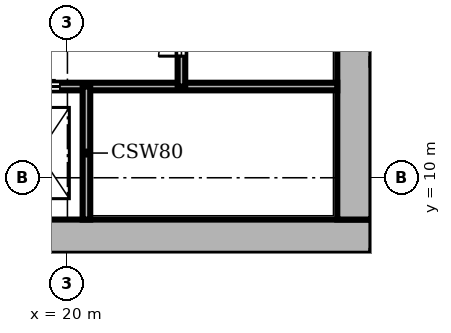
"""IFC4 building model, lengths in metres.
Left out: names, types, materials, properties, quantities, classifications, styles, units other than length and angle.
Written with IfcOpenShell. Run it as: python <this file> out.ifc"""

import sys

from ifc_helpers import new_model, si_unit, direction, frame, frame_2d, origin, place, context, subcontext, project, spatial, rectangle, extrude, element, fill, save


model = new_model("IFC4")
c1 = context("Model", 3, precision=1e-05, world=origin(), true_north=direction((0.0, 1.0)))
c2 = subcontext(c1, "Body", "Model", "MODEL_VIEW")
j1 = project(units=[si_unit("LENGTHUNIT", "METRE"), si_unit("PLANEANGLEUNIT", "RADIAN")], contexts=[c1])
p1 = place(None, origin())
s1 = spatial("IfcSite", under=j1, at=p1, CompositionType="ELEMENT")
p2 = place(p1, origin())
s2 = spatial("IfcBuilding", under=s1, at=p2, CompositionType="ELEMENT")
p3 = place(p2, frame((0.0, 0.0, 82.2)))
s3 = spatial("IfcBuildingStorey", under=s2, at=p3, CompositionType="ELEMENT", Elevation=82.2)
p4 = place(p3, frame((8.0, 8.45, 0.0), z_axis=(0.0, 0.0, 1.0), x_axis=(1.0, 0.0, 0.0)))
e1 = element("IfcWall", 1, at=p4, inside=s3, PredefinedType="SHEAR", context=c2, shape_type="SweptSolid", body=[
    extrude(rectangle(XDim=20.0, YDim=0.9, at=frame_2d((10.0, 0.0))), origin(), (0.0, 0.0, 1.0), 3.9),
])
p5 = place(p3, frame((27.55, 8.9, 0.0), z_axis=(0.0, 0.0, 1.0), x_axis=(0.0, 1.0, 0.0)))
e2 = element("IfcWall", 2, at=p5, inside=s3, PredefinedType="SHEAR", context=c2, shape_type="SweptSolid", body=[
    extrude(rectangle(XDim=18.2, YDim=0.9, at=frame_2d((9.1, 0.0))), origin(), (0.0, 0.0, 1.0), 3.9),
])
p6 = place(p5, frame((4.55, 0.0, 0.0)))
e3 = element("IfcOpeningElement", 3, at=p6, cuts=e2, PredefinedType="OPENING", context=c2, shape_type="SweptSolid", body=[
    extrude(rectangle(XDim=1.6, YDim=2.1, at=frame_2d((0.8, 1.05))), frame((0.0, 0.46, 0.0), z_axis=(0.0, -1.0, 0.0), x_axis=(1.0, 0.0, 0.0)), (0.0, 0.0, 1.0), 0.92),
])
p7 = place(p3, frame((13.8, 12.4, 0.0), z_axis=(0.0, 0.0, 1.0), x_axis=(1.0, 0.0, 0.0)))
e4 = element("IfcWall", 4, at=p7, inside=s3, PredefinedType="SHEAR", context=c2, shape_type="SweptSolid", body=[
    extrude(rectangle(XDim=13.3, YDim=0.2, at=frame_2d((6.65, 0.0))), origin(), (0.0, 0.0, 1.0), 3.58),
])
p8 = place(p7, frame((2.4, 0.0, 0.0)))
e5 = element("IfcOpeningElement", 5, at=p8, cuts=e4, PredefinedType="OPENING", context=c2, shape_type="SweptSolid", body=[
    extrude(rectangle(XDim=1.1, YDim=2.1, at=frame_2d((0.55, 1.05))), frame((0.0, 0.11, 0.0), z_axis=(0.0, -1.0, 0.0), x_axis=(1.0, 0.0, 0.0)), (0.0, 0.0, 1.0), 0.22),
])
p9 = place(p7, frame((4.9, 0.0, 0.0)))
e6 = element("IfcOpeningElement", 6, at=p9, cuts=e4, PredefinedType="OPENING", context=c2, shape_type="SweptSolid", body=[
    extrude(rectangle(XDim=1.1, YDim=2.1, at=frame_2d((0.55, 1.05))), frame((0.0, 0.11, 0.0), z_axis=(0.0, -1.0, 0.0), x_axis=(1.0, 0.0, 0.0)), (0.0, 0.0, 1.0), 0.22),
])
p10 = place(p7, frame((0.25, 0.0, 0.0)))
e7 = element("IfcOpeningElement", 7, at=p10, cuts=e4, PredefinedType="OPENING", context=c2, shape_type="SweptSolid", body=[
    extrude(rectangle(XDim=1.0, YDim=2.1, at=frame_2d((0.5, 1.05))), frame((0.0, 0.11, 0.0), z_axis=(0.0, -1.0, 0.0), x_axis=(1.0, 0.0, 0.0)), (0.0, 0.0, 1.0), 0.22),
])
p11 = place(p3, frame((20.5, 8.9, 0.0), z_axis=(0.0, 0.0, 1.0), x_axis=(0.0, 1.0, 0.0)))
e8 = element("IfcWall", 8, at=p11, inside=s3, PredefinedType="SHEAR", context=c2, shape_type="SweptSolid", body=[
    extrude(rectangle(XDim=3.5, YDim=0.2, at=frame_2d((1.75, 0.0))), origin(), (0.0, 0.0, 1.0), 3.58),
])
p12 = place(p3, frame((23.0, 12.4, 0.0), z_axis=(0.0, 0.0, 1.0), x_axis=(0.0, 1.0, 0.0)))
e9 = element("IfcWall", 9, at=p12, inside=s3, PredefinedType="SHEAR", context=c2, shape_type="SweptSolid", body=[
    extrude(rectangle(XDim=2.8, YDim=0.2, at=frame_2d((1.4, 0.0))), origin(), (0.0, 0.0, 1.0), 3.58),
])
p13 = place(p12, frame((0.8, 0.0, 0.0)))
e10 = element("IfcOpeningElement", 10, at=p13, cuts=e9, PredefinedType="OPENING", context=c2, shape_type="SweptSolid", body=[
    extrude(rectangle(XDim=1.2, YDim=2.1, at=frame_2d((0.6, 1.05))), frame((0.0, 0.11, 0.0), z_axis=(0.0, -1.0, 0.0), x_axis=(1.0, 0.0, 0.0)), (0.0, 0.0, 1.0), 0.22),
])
p14 = place(p9, origin())
e11 = element("IfcDoor", 11, at=p14, inside=s3, OperationType="DOUBLE_DOOR_SLIDING", PredefinedType="DOOR", context=c2, shape_type="SweptSolid", body=[
    extrude(rectangle(XDim=1.1, YDim=2.1, at=frame_2d((0.55, 1.05))), frame((0.0, 0.025, 0.0), z_axis=(0.0, -1.0, 0.0), x_axis=(1.0, 0.0, 0.0)), (0.0, 0.0, 1.0), 0.05),
])
fill(e6, e11)
p15 = place(p13, origin())
e12 = element("IfcDoor", 12, at=p15, inside=s3, OperationType="DOUBLE_DOOR_SINGLE_SWING", PredefinedType="DOOR", context=c2, shape_type="SweptSolid", body=[
    extrude(rectangle(XDim=1.2, YDim=2.1, at=frame_2d((0.6, 1.05))), frame((0.0, 0.025, 0.0), z_axis=(0.0, -1.0, 0.0), x_axis=(1.0, 0.0, 0.0)), (0.0, 0.0, 1.0), 0.05),
])
fill(e10, e12)
save(model, sys.argv[1])
